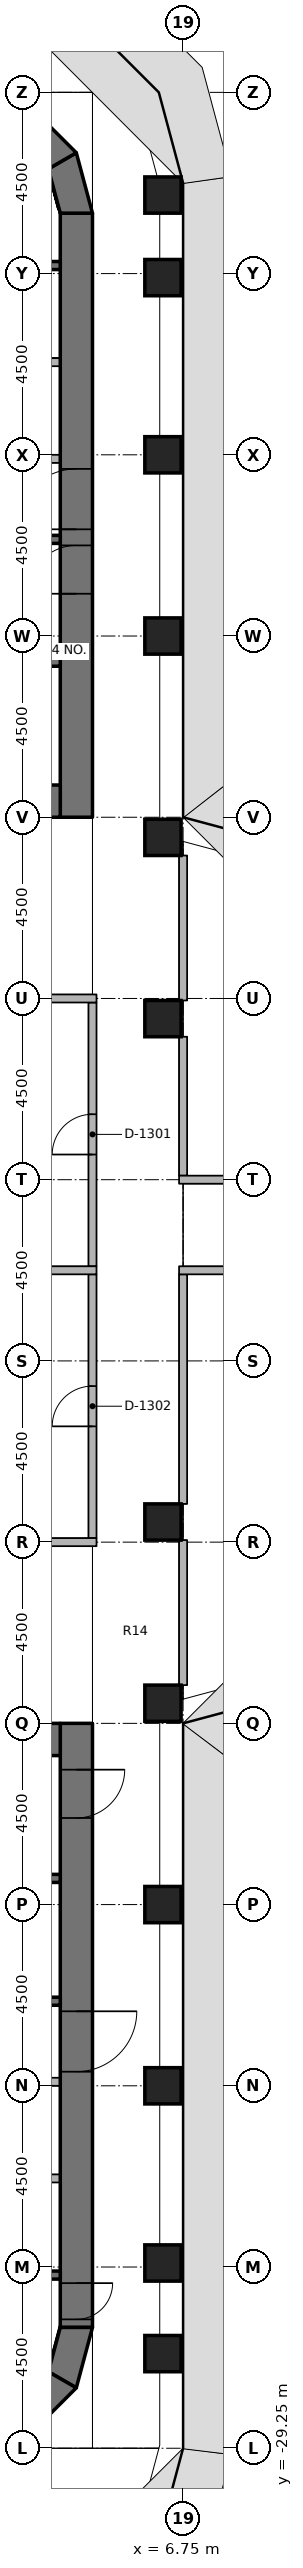
"""IFC4 building model, lengths in metres.
Left out: names, types, materials, properties, quantities, classifications, styles, units other than length and angle.
Written with IfcOpenShell. Run it as: python <this file> out.ifc"""

import sys

from ifc_helpers import new_model, si_unit, direction, frame, frame_2d, origin, origin_2d, place, context, subcontext, project, spatial, polyline, rectangle, outline, extrude, element, fill, save


model = new_model("IFC4")
c1 = context("Model", 3, precision=1e-05, world=origin(), true_north=direction((0.0, 1.0)))
c2 = subcontext(c1, "Body", "Model", "MODEL_VIEW")
j1 = project(units=[si_unit("LENGTHUNIT", "METRE"), si_unit("PLANEANGLEUNIT", "RADIAN")], contexts=[c1])
p1 = place(None, origin())
s1 = spatial("IfcSite", under=j1, at=p1, CompositionType="ELEMENT")
p2 = place(p1, origin())
s2 = spatial("IfcBuilding", under=s1, at=p2, CompositionType="ELEMENT")
p3 = place(p2, frame((0.0, 0.0, 132.2)))
s3 = spatial("IfcBuildingStorey", under=s2, at=p3, CompositionType="ELEMENT", Elevation=132.2)
for number, where, z_axis, x_axis in (
    (1, (6.25, -26.9, 0.0), (0.0, 0.0, 1.0), (1.0, 0.0, 0.0)),
    (2, (6.25, -24.65, 0.0), (0.0, 0.0, 1.0), (1.0, 0.0, 0.0)),
    (3, (6.25, -20.25, 0.0), (0.0, 0.0, 1.0), (1.0, 0.0, 0.0)),
    (4, (6.25, -15.75, 0.0), (0.0, 0.0, 1.0), (1.0, 0.0, 0.0)),
    (5, (6.25, -10.75, 0.0), (0.0, 0.0, 1.0), (1.0, 0.0, 0.0)),
    (6, (6.25, -6.25, 0.0), (0.0, 0.0, 1.0), (1.0, 0.0, 0.0)),
    (7, (6.25, 6.25, 0.0), (0.0, 0.0, 1.0), (1.0, 0.0, 0.0)),
    (8, (6.25, 10.75, 0.0), (0.0, 0.0, 1.0), (1.0, 0.0, 0.0)),
    (9, (6.25, 15.75, 0.0), (0.0, 0.0, 1.0), (1.0, 0.0, 0.0)),
    (10, (6.25, 20.25, 0.0), (0.0, 0.0, 1.0), (1.0, 0.0, 0.0)),
    (11, (6.25, 24.65, 0.0), (0.0, 0.0, 1.0), (1.0, 0.0, 0.0)),
    (12, (6.25, 26.7, 0.0), (0.0, 0.0, 1.0), (1.0, 0.0, 0.0)),
):
    element("IfcColumn", number, at=place(p3, frame(where, z_axis=z_axis, x_axis=x_axis)), inside=s3, PredefinedType="COLUMN", context=c2, shape_type="SweptSolid", body=[
        extrude(rectangle(XDim=0.9, YDim=0.9, at=origin_2d()), origin(), (0.0, 0.0, 1.0), 3.65),
    ])
p4 = place(p3, frame((4.1, 11.25, 0.0), z_axis=(0.0, 0.0, 1.0), x_axis=(0.0, 1.0, 0.0)))
e13 = element("IfcWall", 13, at=p4, inside=s3, PredefinedType="SHEAR", context=c2, shape_type="SweptSolid", body=[
    extrude(rectangle(XDim=15.0, YDim=0.8, at=frame_2d((7.5, 0.0))), origin(), (0.0, 0.0, 1.0), 3.8),
])
p5 = place(p4, frame((7.15, 0.0, 0.0)))
e14 = element("IfcOpeningElement", 14, at=p5, cuts=e13, PredefinedType="OPENING", context=c2, shape_type="SweptSolid", body=[
    extrude(rectangle(XDim=1.5, YDim=2.3, at=frame_2d((0.75, 1.15))), frame((0.0, 0.41, 0.0), z_axis=(0.0, -1.0, 0.0), x_axis=(1.0, 0.0, 0.0)), (0.0, 0.0, 1.0), 0.82),
])
p6 = place(p4, frame((5.55, 0.0, 0.0)))
e15 = element("IfcOpeningElement", 15, at=p6, cuts=e13, PredefinedType="OPENING", context=c2, shape_type="SweptSolid", body=[
    extrude(rectangle(XDim=1.2, YDim=2.1, at=frame_2d((0.6, 1.05))), frame((0.0, 0.41, 0.0), z_axis=(0.0, -1.0, 0.0), x_axis=(1.0, 0.0, 0.0)), (0.0, 0.0, 1.0), 0.82),
])
p7 = place(p3, frame((-3.7, 11.65, 0.0), z_axis=(0.0, 0.0, 1.0), x_axis=(1.0, 0.0, 0.0)))
e16 = element("IfcWall", 16, at=p7, inside=s3, PredefinedType="SHEAR", context=c2, shape_type="SweptSolid", body=[
    extrude(rectangle(XDim=7.4, YDim=0.8, at=frame_2d((3.7, 0.0))), origin(), (0.0, 0.0, 1.0), 3.8),
])
p8 = place(p3, origin())
e17 = element("IfcWall", 17, at=p8, inside=s3, PredefinedType="SHEAR", context=c2, shape_type="SweptSolid", body=[
    extrude(outline(polyline([(4.5, 26.25), (4.098, 27.75), (3.405, 27.35), (3.7, 26.25), (4.5, 26.25)])), origin(), (0.0, 0.0, 1.0), 3.8),
])
p9 = place(p3, origin())
e18 = element("IfcWall", 18, at=p9, inside=s3, PredefinedType="SHEAR", context=c2, shape_type="SweptSolid", body=[
    extrude(outline(polyline([(4.098, 27.75), (3.0, 28.848), (2.6, 28.155), (3.405, 27.35), (4.098, 27.75)])), origin(), (0.0, 0.0, 1.0), 3.8),
])
p10 = place(p3, frame((4.1, -11.25, 0.0), z_axis=(0.0, 0.0, 1.0), x_axis=(0.0, -1.0, 0.0)))
e19 = element("IfcWall", 19, at=p10, inside=s3, PredefinedType="SHEAR", context=c2, shape_type="SweptSolid", body=[
    extrude(rectangle(XDim=15.0, YDim=0.8, at=frame_2d((7.5, 0.0))), origin(), (0.0, 0.0, 1.0), 3.8),
])
p11 = place(p10, frame((7.15, 0.0, 0.0)))
e20 = element("IfcOpeningElement", 20, at=p11, cuts=e19, PredefinedType="OPENING", context=c2, shape_type="SweptSolid", body=[
    extrude(rectangle(XDim=1.5, YDim=2.3, at=frame_2d((0.75, 1.15))), frame((0.0, 0.41, 0.0), z_axis=(0.0, -1.0, 0.0), x_axis=(1.0, 0.0, 0.0)), (0.0, 0.0, 1.0), 0.82),
])
p12 = place(p10, frame((13.9, 0.0, 0.0)))
e21 = element("IfcOpeningElement", 21, at=p12, cuts=e19, PredefinedType="OPENING", context=c2, shape_type="SweptSolid", body=[
    extrude(rectangle(XDim=0.9, YDim=2.1, at=frame_2d((0.45, 1.05))), frame((0.0, 0.41, 0.0), z_axis=(0.0, -1.0, 0.0), x_axis=(1.0, 0.0, 0.0)), (0.0, 0.0, 1.0), 0.82),
])
p13 = place(p10, frame((1.15, 0.0, 0.0)))
e22 = element("IfcOpeningElement", 22, at=p13, cuts=e19, PredefinedType="OPENING", context=c2, shape_type="SweptSolid", body=[
    extrude(rectangle(XDim=1.2, YDim=2.1, at=frame_2d((0.6, 1.05))), frame((0.0, 0.41, 0.0), z_axis=(0.0, -1.0, 0.0), x_axis=(1.0, 0.0, 0.0)), (0.0, 0.0, 1.0), 0.82),
])
p14 = place(p3, frame((-3.7, -11.65, 0.0), z_axis=(0.0, 0.0, 1.0), x_axis=(1.0, 0.0, 0.0)))
e23 = element("IfcWall", 23, at=p14, inside=s3, PredefinedType="SHEAR", context=c2, shape_type="SweptSolid", body=[
    extrude(rectangle(XDim=7.4, YDim=0.8, at=frame_2d((3.7, 0.0))), origin(), (0.0, 0.0, 1.0), 3.8),
])
p15 = place(p3, origin())
e24 = element("IfcWall", 24, at=p15, inside=s3, PredefinedType="SHEAR", context=c2, shape_type="SweptSolid", body=[
    extrude(outline(polyline([(4.5, -26.25), (4.098, -27.75), (3.405, -27.35), (3.7, -26.25), (4.5, -26.25)])), origin(), (0.0, 0.0, 1.0), 3.8),
])
p16 = place(p3, origin())
e25 = element("IfcWall", 25, at=p16, inside=s3, PredefinedType="SHEAR", context=c2, shape_type="SweptSolid", body=[
    extrude(outline(polyline([(4.098, -27.75), (3.0, -28.848), (2.6, -28.155), (3.405, -27.35), (4.098, -27.75)])), origin(), (0.0, 0.0, 1.0), 3.8),
])
for number, where, z_axis, x_axis in (
    (26, (-3.7, 24.95, 0.0), (0.0, 0.0, 1.0), (1.0, 0.0, 0.0)),
    (27, (-3.7, 18.15, 0.0), (0.0, 0.0, 1.0), (1.0, 0.0, 0.0)),
    (28, (-3.7, 15.1, 0.0), (0.0, 0.0, 1.0), (1.0, 0.0, 0.0)),
):
    element("IfcWall", number, at=place(p3, frame(where, z_axis=z_axis, x_axis=x_axis)), inside=s3, PredefinedType="SHEAR", context=c2, shape_type="SweptSolid", body=[
        extrude(rectangle(XDim=7.4, YDim=0.2, at=frame_2d((3.7, 0.0))), origin(), (0.0, 0.0, 1.0), 3.65),
    ])
p17 = place(p3, frame((0.9, 20.15, 0.0), z_axis=(0.0, 0.0, 1.0), x_axis=(1.0, 0.0, 0.0)))
e29 = element("IfcWall", 29, at=p17, inside=s3, PredefinedType="PARTITIONING", context=c2, shape_type="SweptSolid", body=[
    extrude(rectangle(XDim=2.8, YDim=0.2, at=frame_2d((1.4, 0.0))), origin(), (0.0, 0.0, 1.0), 3.65),
])
p18 = place(p3, frame((1.1, 22.55, 0.0), z_axis=(0.0, 0.0, 1.0), x_axis=(1.0, 0.0, 0.0)))
e30 = element("IfcWall", 30, at=p18, inside=s3, PredefinedType="PARTITIONING", context=c2, shape_type="SweptSolid", body=[
    extrude(rectangle(XDim=2.6, YDim=0.2, at=frame_2d((1.3, 0.0))), origin(), (0.0, 0.0, 1.0), 3.65),
])
for number, where, z_axis, x_axis in (
    (31, (3.7, -24.95, 0.0), (0.0, 0.0, 1.0), (-1.0, 0.0, 0.0)),
    (32, (3.7, -18.15, 0.0), (0.0, 0.0, 1.0), (-1.0, 0.0, 0.0)),
    (33, (3.7, -15.1, 0.0), (0.0, 0.0, 1.0), (-1.0, 0.0, 0.0)),
):
    element("IfcWall", number, at=place(p3, frame(where, z_axis=z_axis, x_axis=x_axis)), inside=s3, PredefinedType="SHEAR", context=c2, shape_type="SweptSolid", body=[
        extrude(rectangle(XDim=7.4, YDim=0.2, at=frame_2d((3.7, 0.0))), origin(), (0.0, 0.0, 1.0), 3.65),
    ])
p19 = place(p3, frame((3.7, -20.15, 0.0), z_axis=(0.0, 0.0, 1.0), x_axis=(-1.0, 0.0, 0.0)))
e34 = element("IfcWall", 34, at=p19, inside=s3, PredefinedType="PARTITIONING", context=c2, shape_type="SweptSolid", body=[
    extrude(rectangle(XDim=2.8, YDim=0.2, at=frame_2d((1.4, 0.0))), origin(), (0.0, 0.0, 1.0), 3.65),
])
p20 = place(p3, frame((3.7, -22.55, 0.0), z_axis=(0.0, 0.0, 1.0), x_axis=(-1.0, 0.0, 0.0)))
e35 = element("IfcWall", 35, at=p20, inside=s3, PredefinedType="PARTITIONING", context=c2, shape_type="SweptSolid", body=[
    extrude(rectangle(XDim=2.6, YDim=0.2, at=frame_2d((1.3, 0.0))), origin(), (0.0, 0.0, 1.0), 3.65),
])
p21 = place(p3, frame((4.5, 0.1, 0.0), z_axis=(0.0, 0.0, 1.0), x_axis=(0.0, 1.0, 0.0)))
e36 = element("IfcWall", 36, at=p21, inside=s3, PredefinedType="PARTITIONING", context=c2, shape_type="SweptSolid", body=[
    extrude(rectangle(XDim=6.55, YDim=0.2, at=frame_2d((3.275, 0.0))), origin(), (0.0, 0.0, 1.0), 2.738),
])
p22 = place(p21, frame((2.775, 0.0, 0.0)))
e37 = element("IfcOpeningElement", 37, at=p22, cuts=e36, PredefinedType="OPENING", context=c2, shape_type="SweptSolid", body=[
    extrude(rectangle(XDim=1.0, YDim=2.1, at=frame_2d((0.5, 1.05))), frame((0.0, 0.11, 0.0), z_axis=(0.0, -1.0, 0.0), x_axis=(1.0, 0.0, 0.0)), (0.0, 0.0, 1.0), 0.22),
])
p23 = place(p3, frame((4.5, -6.65, 0.0), z_axis=(0.0, 0.0, 1.0), x_axis=(0.0, 1.0, 0.0)))
e38 = element("IfcWall", 38, at=p23, inside=s3, PredefinedType="PARTITIONING", context=c2, shape_type="SweptSolid", body=[
    extrude(rectangle(XDim=6.55, YDim=0.2, at=frame_2d((3.275, 0.0))), origin(), (0.0, 0.0, 1.0), 2.738),
])
p24 = place(p23, frame((2.775, 0.0, 0.0)))
e39 = element("IfcOpeningElement", 39, at=p24, cuts=e38, PredefinedType="OPENING", context=c2, shape_type="SweptSolid", body=[
    extrude(rectangle(XDim=1.0, YDim=2.1, at=frame_2d((0.5, 1.05))), frame((0.0, 0.11, 0.0), z_axis=(0.0, -1.0, 0.0), x_axis=(1.0, 0.0, 0.0)), (0.0, 0.0, 1.0), 0.22),
])
p25 = place(p3, frame((6.75, 2.35, 0.0), z_axis=(0.0, 0.0, 1.0), x_axis=(0.0, 1.0, 0.0)))
e40 = element("IfcWall", 40, at=p25, inside=s3, PredefinedType="PARTITIONING", context=c2, shape_type="SweptSolid", body=[
    extrude(rectangle(XDim=3.45, YDim=0.2, at=frame_2d((1.725, 0.0))), origin(), (0.0, 0.0, 1.0), 2.738),
])
for number, where, z_axis, x_axis in (
    (41, (6.75, 6.7, 0.0), (0.0, 0.0, 1.0), (0.0, 1.0, 0.0)),
    (42, (6.75, -10.3, 0.0), (0.0, 0.0, 1.0), (0.0, 1.0, 0.0)),
):
    element("IfcWall", number, at=place(p3, frame(where, z_axis=z_axis, x_axis=x_axis)), inside=s3, PredefinedType="PARTITIONING", context=c2, shape_type="SweptSolid", body=[
        extrude(rectangle(XDim=3.6, YDim=0.2, at=frame_2d((1.8, 0.0))), origin(), (0.0, 0.0, 1.0), 2.738),
    ])
p26 = place(p3, frame((6.75, -5.8, 0.0), z_axis=(0.0, 0.0, 1.0), x_axis=(0.0, 1.0, 0.0)))
e43 = element("IfcWall", 43, at=p26, inside=s3, PredefinedType="PARTITIONING", context=c2, shape_type="SweptSolid", body=[
    extrude(rectangle(XDim=5.7, YDim=0.2, at=frame_2d((2.85, 0.0))), origin(), (0.0, 0.0, 1.0), 2.738),
])
for number, where, z_axis, x_axis in (
    (44, (-0.1, 6.75, 0.0), (0.0, 0.0, 1.0), (1.0, 0.0, 0.0)),
    (45, (-0.1, -6.75, 0.0), (0.0, 0.0, 1.0), (1.0, 0.0, 0.0)),
    (46, (-0.1, 0.0, 0.0), (0.0, 0.0, 1.0), (1.0, 0.0, 0.0)),
):
    element("IfcWall", number, at=place(p3, frame(where, z_axis=z_axis, x_axis=x_axis)), inside=s3, PredefinedType="PARTITIONING", context=c2, shape_type="SweptSolid", body=[
        extrude(rectangle(XDim=4.7, YDim=0.2, at=frame_2d((2.35, 0.0))), origin(), (0.0, 0.0, 1.0), 2.738),
    ])
p27 = place(p3, frame((6.65, 2.25, 0.0), z_axis=(0.0, 0.0, 1.0), x_axis=(1.0, 0.0, 0.0)))
e47 = element("IfcWall", 47, at=p27, inside=s3, PredefinedType="PARTITIONING", context=c2, shape_type="SweptSolid", body=[
    extrude(rectangle(XDim=4.7, YDim=0.2, at=frame_2d((2.35, 0.0))), origin(), (0.0, 0.0, 1.0), 2.738),
])
p28 = place(p27, frame((1.85, 0.0, 0.0)))
e48 = element("IfcOpeningElement", 48, at=p28, cuts=e47, PredefinedType="OPENING", context=c2, shape_type="SweptSolid", body=[
    extrude(rectangle(XDim=1.0, YDim=2.1, at=frame_2d((0.5, 1.05))), frame((0.0, 0.11, 0.0), z_axis=(0.0, -1.0, 0.0), x_axis=(1.0, 0.0, 0.0)), (0.0, 0.0, 1.0), 0.22),
])
p29 = place(p3, frame((11.35, 0.0, 0.0), z_axis=(0.0, 0.0, 1.0), x_axis=(-1.0, 0.0, 0.0)))
e49 = element("IfcWall", 49, at=p29, inside=s3, PredefinedType="PARTITIONING", context=c2, shape_type="SweptSolid", body=[
    extrude(rectangle(XDim=4.7, YDim=0.2, at=frame_2d((2.35, 0.0))), origin(), (0.0, 0.0, 1.0), 2.738),
])
p30 = place(p29, frame((1.85, 0.0, 0.0)))
e50 = element("IfcOpeningElement", 50, at=p30, cuts=e49, PredefinedType="OPENING", context=c2, shape_type="SweptSolid", body=[
    extrude(rectangle(XDim=1.0, YDim=2.1, at=frame_2d((0.5, 1.05))), frame((0.0, 0.11, 0.0), z_axis=(0.0, -1.0, 0.0), x_axis=(1.0, 0.0, 0.0)), (0.0, 0.0, 1.0), 0.22),
])
p31 = place(p5, origin())
e51 = element("IfcDoor", 51, at=p31, inside=s3, OperationType="DOUBLE_DOOR_SINGLE_SWING", PredefinedType="DOOR", context=c2, shape_type="SweptSolid", body=[
    extrude(rectangle(XDim=1.5, YDim=2.3, at=frame_2d((0.75, 1.15))), frame((0.0, 0.025, 0.0), z_axis=(0.0, -1.0, 0.0), x_axis=(1.0, 0.0, 0.0)), (0.0, 0.0, 1.0), 0.05),
])
fill(e14, e51)
p32 = place(p6, origin())
e52 = element("IfcDoor", 52, at=p32, inside=s3, OperationType="SINGLE_SWING_LEFT", PredefinedType="DOOR", context=c2, shape_type="SweptSolid", body=[
    extrude(rectangle(XDim=1.2, YDim=2.1, at=frame_2d((0.6, 1.05))), frame((0.0, 0.025, 0.0), z_axis=(0.0, -1.0, 0.0), x_axis=(1.0, 0.0, 0.0)), (0.0, 0.0, 1.0), 0.05),
])
fill(e15, e52)
p33 = place(p11, origin())
e53 = element("IfcDoor", 53, at=p33, inside=s3, OperationType="DOUBLE_DOOR_SINGLE_SWING", PredefinedType="DOOR", context=c2, shape_type="SweptSolid", body=[
    extrude(rectangle(XDim=1.5, YDim=2.3, at=frame_2d((0.75, 1.15))), frame((0.0, 0.025, 0.0), z_axis=(0.0, -1.0, 0.0), x_axis=(1.0, 0.0, 0.0)), (0.0, 0.0, 1.0), 0.05),
])
fill(e20, e53)
p34 = place(p12, origin())
e54 = element("IfcDoor", 54, at=p34, inside=s3, OperationType="SINGLE_SWING_LEFT", PredefinedType="DOOR", context=c2, shape_type="SweptSolid", body=[
    extrude(rectangle(XDim=0.9, YDim=2.1, at=frame_2d((0.45, 1.05))), frame((0.0, 0.025, 0.0), z_axis=(0.0, -1.0, 0.0), x_axis=(1.0, 0.0, 0.0)), (0.0, 0.0, 1.0), 0.05),
])
fill(e21, e54)
p35 = place(p13, origin())
e55 = element("IfcDoor", 55, at=p35, inside=s3, OperationType="SINGLE_SWING_LEFT", PredefinedType="DOOR", context=c2, shape_type="SweptSolid", body=[
    extrude(rectangle(XDim=1.2, YDim=2.1, at=frame_2d((0.6, 1.05))), frame((0.0, 0.025, 0.0), z_axis=(0.0, -1.0, 0.0), x_axis=(1.0, 0.0, 0.0)), (0.0, 0.0, 1.0), 0.05),
])
fill(e22, e55)
p36 = place(p22, origin())
e56 = element("IfcDoor", 56, at=p36, inside=s3, OperationType="SINGLE_SWING_LEFT", PredefinedType="DOOR", context=c2, shape_type="SweptSolid", body=[
    extrude(rectangle(XDim=1.0, YDim=2.1, at=frame_2d((0.5, 1.05))), frame((0.0, 0.025, 0.0), z_axis=(0.0, -1.0, 0.0), x_axis=(1.0, 0.0, 0.0)), (0.0, 0.0, 1.0), 0.05),
])
fill(e37, e56)
p37 = place(p24, origin())
e57 = element("IfcDoor", 57, at=p37, inside=s3, OperationType="SINGLE_SWING_RIGHT", PredefinedType="DOOR", context=c2, shape_type="SweptSolid", body=[
    extrude(rectangle(XDim=1.0, YDim=2.1, at=frame_2d((0.5, 1.05))), frame((0.0, 0.025, 0.0), z_axis=(0.0, -1.0, 0.0), x_axis=(1.0, 0.0, 0.0)), (0.0, 0.0, 1.0), 0.05),
])
fill(e39, e57)
save(model, sys.argv[1])
